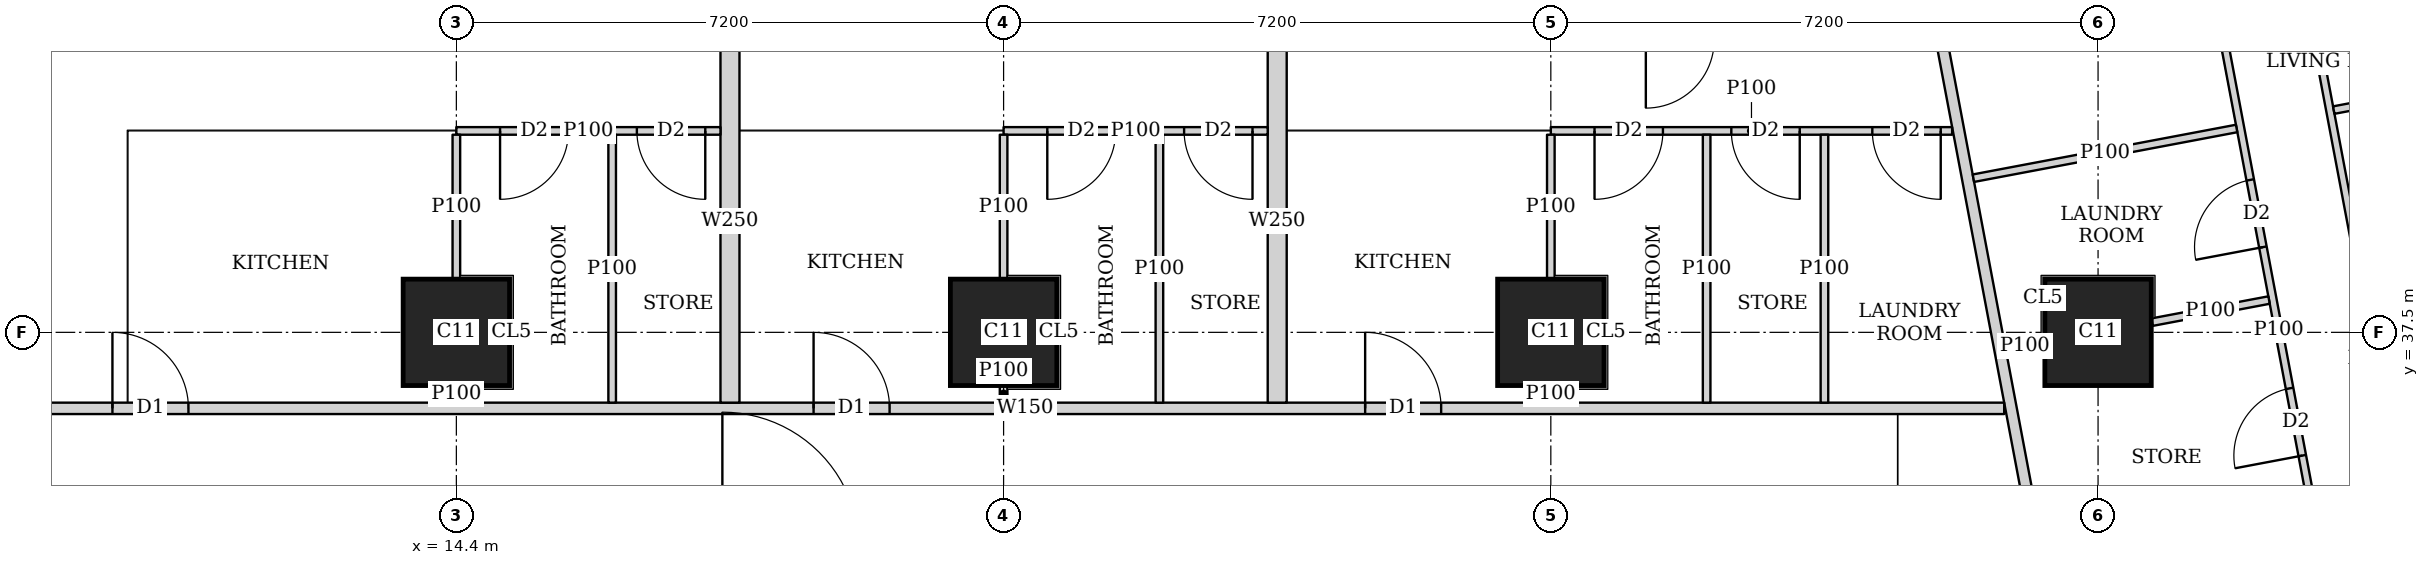
"""IFC4 building model, lengths in metres.
Left out: names, types, materials, properties, quantities, classifications, styles, units other than length and angle.
Written with IfcOpenShell. Run it as: python <this file> out.ifc"""

import sys

from ifc_helpers import new_model, si_unit, direction, frame, frame_2d, origin, origin_2d, place, context, subcontext, project, spatial, rectangle, extrude, element, fill, save


model = new_model("IFC4")
c1 = context("Model", 3, precision=1e-05, world=origin(), true_north=direction((0.0, 1.0)))
c2 = subcontext(c1, "Body", "Model", "MODEL_VIEW")
j1 = project(units=[si_unit("LENGTHUNIT", "METRE"), si_unit("PLANEANGLEUNIT", "RADIAN")], contexts=[c1])
p1 = place(None, origin())
s1 = spatial("IfcSite", under=j1, at=p1, CompositionType="ELEMENT")
p2 = place(p1, origin())
s2 = spatial("IfcBuilding", under=s1, at=p2, CompositionType="ELEMENT")
p3 = place(p2, frame((0.0, 0.0, 212.45)))
s3 = spatial("IfcBuildingStorey", under=s2, at=p3, CompositionType="ELEMENT", Elevation=212.45)
for number, where, z_axis, x_axis in (
    (1, (14.4, 37.5, 0.0), (0.0, 0.0, 1.0), (1.0, 0.0, 0.0)),
    (2, (21.6, 37.5, 0.0), (0.0, 0.0, 1.0), (1.0, 0.0, 0.0)),
    (3, (28.8, 37.5, 0.0), (0.0, 0.0, 1.0), (1.0, 0.0, 0.0)),
    (4, (36.0, 37.5, 0.0), (0.0, 0.0, 1.0), (1.0, 0.0, 0.0)),
):
    element("IfcColumn", number, at=place(p3, frame(where, z_axis=z_axis, x_axis=x_axis)), inside=s3, PredefinedType="COLUMN", context=c2, shape_type="SweptSolid", body=[
        extrude(rectangle(XDim=1.4, YDim=1.4, at=origin_2d()), origin(), (0.0, 0.0, 1.0), 3.75),
    ])
p4 = place(p3, frame((9.001, 36.5, 0.0), z_axis=(0.0, 0.0, 1.0), x_axis=(1.0, 0.0, 0.0)))
e5 = element("IfcWall", 5, at=p4, inside=s3, PredefinedType="SOLIDWALL", context=c2, shape_type="SweptSolid", body=[
    extrude(rectangle(XDim=25.764, YDim=0.15, at=frame_2d((12.882, 0.0))), origin(), (0.0, 0.0, 1.0), 3.5),
])
p5 = place(p4, frame((0.874, 0.0, 0.0)))
e6 = element("IfcOpeningElement", 6, at=p5, cuts=e5, PredefinedType="OPENING", context=c2, shape_type="SweptSolid", body=[
    extrude(rectangle(XDim=1.0, YDim=2.1, at=frame_2d((0.5, 1.05))), frame((0.0, 0.085, 0.0), z_axis=(0.0, -1.0, 0.0), x_axis=(1.0, 0.0, 0.0)), (0.0, 0.0, 1.0), 0.17),
])
p6 = place(p4, frame((10.099, 0.0, 0.0)))
e7 = element("IfcOpeningElement", 7, at=p6, cuts=e5, PredefinedType="OPENING", context=c2, shape_type="SweptSolid", body=[
    extrude(rectangle(XDim=1.0, YDim=2.1, at=frame_2d((0.5, 1.05))), frame((0.0, 0.085, 0.0), z_axis=(0.0, -1.0, 0.0), x_axis=(1.0, 0.0, 0.0)), (0.0, 0.0, 1.0), 0.17),
])
p7 = place(p4, frame((17.356, 0.0, 0.0)))
e8 = element("IfcOpeningElement", 8, at=p7, cuts=e5, PredefinedType="OPENING", context=c2, shape_type="SweptSolid", body=[
    extrude(rectangle(XDim=1.0, YDim=2.1, at=frame_2d((0.5, 1.05))), frame((0.0, 0.085, 0.0), z_axis=(0.0, -1.0, 0.0), x_axis=(1.0, 0.0, 0.0)), (0.0, 0.0, 1.0), 0.17),
])
p8 = place(p3, frame((33.68, 42.723, 0.0), z_axis=(0.0, 0.0, 1.0), x_axis=(0.185601160014, -0.982625162207, 0.0)))
e9 = element("IfcWall", 9, at=p8, inside=s3, PredefinedType="SOLIDWALL", context=c2, shape_type="SweptSolid", body=[
    extrude(rectangle(XDim=41.051, YDim=0.15, at=frame_2d((20.526, 0.0))), origin(), (0.0, 0.0, 1.0), 2.5),
])
p9 = place(p8, frame((12.307, 0.0, 0.0)))
e10 = element("IfcOpeningElement", 10, at=p9, cuts=e9, PredefinedType="OPENING", context=c2, shape_type="SweptSolid", body=[
    extrude(rectangle(XDim=1.0, YDim=2.1, at=frame_2d((0.5, 1.05))), frame((0.0, 0.085, 0.0), z_axis=(0.0, -1.0, 0.0), x_axis=(1.0, 0.0, 0.0)), (0.0, 0.0, 1.0), 0.17),
])
p10 = place(p8, frame((16.123, 0.0, 0.0)))
e11 = element("IfcOpeningElement", 11, at=p10, cuts=e9, PredefinedType="OPENING", context=c2, shape_type="SweptSolid", body=[
    extrude(rectangle(XDim=1.0, YDim=2.1, at=frame_2d((0.5, 1.05))), frame((0.0, 0.085, 0.0), z_axis=(0.0, -1.0, 0.0), x_axis=(1.0, 0.0, 0.0)), (0.0, 0.0, 1.0), 0.17),
])
p11 = place(p8, frame((30.902, 0.0, 0.0)))
e12 = element("IfcOpeningElement", 12, at=p11, cuts=e9, PredefinedType="OPENING", context=c2, shape_type="SweptSolid", body=[
    extrude(rectangle(XDim=1.0, YDim=2.1, at=frame_2d((0.5, 1.05))), frame((0.0, 0.085, 0.0), z_axis=(0.0, -1.0, 0.0), x_axis=(1.0, 0.0, 0.0)), (0.0, 0.0, 1.0), 0.17),
])
p12 = place(p3, frame((38.764, 41.941, 0.0), z_axis=(0.0, 0.0, 1.0), x_axis=(0.185548572312, -0.982635093671, 0.0)))
e13 = element("IfcWall", 13, at=p12, inside=s3, PredefinedType="PARTITIONING", context=c2, shape_type="SweptSolid", body=[
    extrude(rectangle(XDim=9.135, YDim=0.1, at=frame_2d((4.568, 0.0))), origin(), (0.0, 0.0, 1.0), 3.5),
])
p13 = place(p12, frame((8.085, 0.0, 0.0)))
e14 = element("IfcOpeningElement", 14, at=p13, cuts=e13, PredefinedType="OPENING", context=c2, shape_type="SweptSolid", body=[
    extrude(rectangle(XDim=0.9, YDim=2.1, at=frame_2d((0.45, 1.05))), frame((0.0, 0.06, 0.0), z_axis=(0.0, -1.0, 0.0), x_axis=(1.0, 0.0, 0.0)), (0.0, 0.0, 1.0), 0.12),
])
p14 = place(p12, frame((3.7, 0.0, 0.0)))
e15 = element("IfcOpeningElement", 15, at=p14, cuts=e13, PredefinedType="OPENING", context=c2, shape_type="SweptSolid", body=[
    extrude(rectangle(XDim=0.9, YDim=2.1, at=frame_2d((0.45, 1.05))), frame((0.0, 0.06, 0.0), z_axis=(0.0, -1.0, 0.0), x_axis=(1.0, 0.0, 0.0)), (0.0, 0.0, 1.0), 0.12),
])
p15 = place(p3, frame((37.473, 42.309, 0.0), z_axis=(0.0, 0.0, 1.0), x_axis=(0.185491912953, -0.982645790827, 0.0)))
e16 = element("IfcWall", 16, at=p15, inside=s3, PredefinedType="PARTITIONING", context=c2, shape_type="SweptSolid", body=[
    extrude(rectangle(XDim=9.737, YDim=0.1, at=frame_2d((4.869, 0.0))), origin(), (0.0, 0.0, 1.0), 3.5),
])
p16 = place(p15, frame((8.312, 0.0, 0.0)))
e17 = element("IfcOpeningElement", 17, at=p16, cuts=e16, PredefinedType="OPENING", context=c2, shape_type="SweptSolid", body=[
    extrude(rectangle(XDim=0.9, YDim=2.1, at=frame_2d((0.45, 1.05))), frame((0.0, 0.06, 0.0), z_axis=(0.0, -1.0, 0.0), x_axis=(1.0, 0.0, 0.0)), (0.0, 0.0, 1.0), 0.12),
])
p17 = place(p15, frame((2.853, 0.0, 0.0)))
e18 = element("IfcOpeningElement", 18, at=p17, cuts=e16, PredefinedType="OPENING", context=c2, shape_type="SweptSolid", body=[
    extrude(rectangle(XDim=0.9, YDim=2.1, at=frame_2d((0.45, 1.05))), frame((0.0, 0.06, 0.0), z_axis=(0.0, -1.0, 0.0), x_axis=(1.0, 0.0, 0.0)), (0.0, 0.0, 1.0), 0.12),
])
p18 = place(p15, frame((5.644, 0.0, 0.0)))
e19 = element("IfcOpeningElement", 19, at=p18, cuts=e16, PredefinedType="OPENING", context=c2, shape_type="SweptSolid", body=[
    extrude(rectangle(XDim=0.9, YDim=2.1, at=frame_2d((0.45, 1.05))), frame((0.0, 0.06, 0.0), z_axis=(0.0, -1.0, 0.0), x_axis=(1.0, 0.0, 0.0)), (0.0, 0.0, 1.0), 0.12),
])
p19 = place(p3, frame((43.277, 41.212, 0.0), z_axis=(0.0, 0.0, 1.0), x_axis=(-0.982665405803, -0.185387972203, 0.0)))
e20 = element("IfcWall", 20, at=p19, inside=s3, PredefinedType="PARTITIONING", context=c2, shape_type="SweptSolid", body=[
    extrude(rectangle(XDim=4.25, YDim=0.1, at=frame_2d((2.125, 0.0))), origin(), (0.0, 0.0, 1.0), 2.05),
])
p20 = place(p3, frame((37.823, 40.182, 0.0), z_axis=(0.0, 0.0, 1.0), x_axis=(-0.98263926043, -0.185526504472, 0.0)))
e21 = element("IfcWall", 21, at=p20, inside=s3, PredefinedType="PARTITIONING", context=c2, shape_type="SweptSolid", body=[
    extrude(rectangle(XDim=3.524, YDim=0.1, at=frame_2d((1.762, 0.0))), origin(), (0.0, 0.0, 1.0), 3.5),
])
p21 = place(p3, frame((38.25, 37.925, 0.0), z_axis=(0.0, 0.0, 1.0), x_axis=(-0.982610209589, -0.185680305934, 0.0)))
e22 = element("IfcWall", 22, at=p21, inside=s3, PredefinedType="PARTITIONING", context=c2, shape_type="SweptSolid", body=[
    extrude(rectangle(XDim=1.567, YDim=0.1, at=frame_2d((0.784, 0.0))), origin(), (0.0, 0.0, 1.0), 3.5),
])
p22 = place(p3, frame((35.29, 37.366, 0.0), z_axis=(0.0, 0.0, 1.0), x_axis=(-0.982715597703, -0.185121727606, 0.0)))
e23 = element("IfcWall", 23, at=p22, inside=s3, PredefinedType="PARTITIONING", context=c2, shape_type="SweptSolid", body=[
    extrude(rectangle(XDim=0.513, YDim=0.1, at=frame_2d((0.256, 0.0))), origin(), (0.0, 0.0, 1.0), 3.5),
])
p23 = place(p3, frame((14.4, 40.15, 0.0), z_axis=(0.0, 0.0, 1.0), x_axis=(1.0, 0.0, 0.0)))
e24 = element("IfcWall", 24, at=p23, inside=s3, PredefinedType="PARTITIONING", context=c2, shape_type="SweptSolid", body=[
    extrude(rectangle(XDim=3.475, YDim=0.1, at=frame_2d((1.738, 0.0))), origin(), (0.0, 0.0, 1.0), 3.5),
])
p24 = place(p23, frame((0.575, 0.0, 0.0)))
e25 = element("IfcOpeningElement", 25, at=p24, cuts=e24, PredefinedType="OPENING", context=c2, shape_type="SweptSolid", body=[
    extrude(rectangle(XDim=0.9, YDim=2.1, at=frame_2d((0.45, 1.05))), frame((0.0, 0.06, 0.0), z_axis=(0.0, -1.0, 0.0), x_axis=(1.0, 0.0, 0.0)), (0.0, 0.0, 1.0), 0.12),
])
p25 = place(p23, frame((2.375, 0.0, 0.0)))
e26 = element("IfcOpeningElement", 26, at=p25, cuts=e24, PredefinedType="OPENING", context=c2, shape_type="SweptSolid", body=[
    extrude(rectangle(XDim=0.9, YDim=2.1, at=frame_2d((0.45, 1.05))), frame((0.0, 0.06, 0.0), z_axis=(0.0, -1.0, 0.0), x_axis=(1.0, 0.0, 0.0)), (0.0, 0.0, 1.0), 0.12),
])
p26 = place(p3, frame((14.4, 36.575, 0.0), z_axis=(0.0, 0.0, 1.0), x_axis=(0.0, 1.0, 0.0)))
e27 = element("IfcWall", 27, at=p26, inside=s3, PredefinedType="PARTITIONING", context=c2, shape_type="SweptSolid", body=[
    extrude(rectangle(XDim=0.224, YDim=0.1, at=frame_2d((0.112, 0.0))), origin(), (0.0, 0.0, 1.0), 3.5),
])
p27 = place(p3, frame((14.4, 38.201, 0.0), z_axis=(0.0, 0.0, 1.0), x_axis=(0.0, 1.0, 0.0)))
e28 = element("IfcWall", 28, at=p27, inside=s3, PredefinedType="PARTITIONING", context=c2, shape_type="SweptSolid", body=[
    extrude(rectangle(XDim=1.899, YDim=0.1, at=frame_2d((0.95, 0.0))), origin(), (0.0, 0.0, 1.0), 3.5),
])
p28 = place(p3, frame((16.45, 36.575, 0.0), z_axis=(0.0, 0.0, 1.0), x_axis=(0.0, 1.0, 0.0)))
e29 = element("IfcWall", 29, at=p28, inside=s3, PredefinedType="PARTITIONING", context=c2, shape_type="SweptSolid", body=[
    extrude(rectangle(XDim=3.525, YDim=0.1, at=frame_2d((1.763, 0.0))), origin(), (0.0, 0.0, 1.0), 3.5),
])
p29 = place(p3, frame((21.6, 40.15, 0.0), z_axis=(0.0, 0.0, 1.0), x_axis=(1.0, 0.0, 0.0)))
e30 = element("IfcWall", 30, at=p29, inside=s3, PredefinedType="PARTITIONING", context=c2, shape_type="SweptSolid", body=[
    extrude(rectangle(XDim=3.475, YDim=0.1, at=frame_2d((1.737, 0.0))), origin(), (0.0, 0.0, 1.0), 3.5),
])
p30 = place(p29, frame((0.575, 0.0, 0.0)))
e31 = element("IfcOpeningElement", 31, at=p30, cuts=e30, PredefinedType="OPENING", context=c2, shape_type="SweptSolid", body=[
    extrude(rectangle(XDim=0.9, YDim=2.1, at=frame_2d((0.45, 1.05))), frame((0.0, 0.06, 0.0), z_axis=(0.0, -1.0, 0.0), x_axis=(1.0, 0.0, 0.0)), (0.0, 0.0, 1.0), 0.12),
])
p31 = place(p29, frame((2.375, 0.0, 0.0)))
e32 = element("IfcOpeningElement", 32, at=p31, cuts=e30, PredefinedType="OPENING", context=c2, shape_type="SweptSolid", body=[
    extrude(rectangle(XDim=0.9, YDim=2.1, at=frame_2d((0.45, 1.05))), frame((0.0, 0.06, 0.0), z_axis=(0.0, -1.0, 0.0), x_axis=(1.0, 0.0, 0.0)), (0.0, 0.0, 1.0), 0.12),
])
p32 = place(p3, frame((21.6, 36.575, 0.0), z_axis=(0.0, 0.0, 1.0), x_axis=(0.0, 1.0, 0.0)))
e33 = element("IfcWall", 33, at=p32, inside=s3, PredefinedType="PARTITIONING", context=c2, shape_type="SweptSolid", body=[
    extrude(rectangle(XDim=0.224, YDim=0.1, at=frame_2d((0.112, 0.0))), origin(), (0.0, 0.0, 1.0), 3.5),
])
p33 = place(p3, frame((21.6, 38.201, 0.0), z_axis=(0.0, 0.0, 1.0), x_axis=(0.0, 1.0, 0.0)))
e34 = element("IfcWall", 34, at=p33, inside=s3, PredefinedType="PARTITIONING", context=c2, shape_type="SweptSolid", body=[
    extrude(rectangle(XDim=1.899, YDim=0.1, at=frame_2d((0.95, 0.0))), origin(), (0.0, 0.0, 1.0), 3.5),
])
p34 = place(p3, frame((23.65, 36.575, 0.0), z_axis=(0.0, 0.0, 1.0), x_axis=(0.0, 1.0, 0.0)))
e35 = element("IfcWall", 35, at=p34, inside=s3, PredefinedType="PARTITIONING", context=c2, shape_type="SweptSolid", body=[
    extrude(rectangle(XDim=3.525, YDim=0.1, at=frame_2d((1.763, 0.0))), origin(), (0.0, 0.0, 1.0), 3.5),
])
p35 = place(p3, frame((18.0, 36.575, 0.0), z_axis=(0.0, 0.0, 1.0), x_axis=(0.0, 1.0, 0.0)))
e36 = element("IfcWall", 36, at=p35, inside=s3, PredefinedType="SOLIDWALL", context=c2, shape_type="SweptSolid", body=[
    extrude(rectangle(XDim=4.775, YDim=0.25, at=frame_2d((2.388, 0.0))), origin(), (0.0, 0.0, 1.0), 3.5),
])
p36 = place(p3, frame((28.8, 40.15, 0.0), z_axis=(0.0, 0.0, 1.0), x_axis=(1.0, 0.0, 0.0)))
e37 = element("IfcWall", 37, at=p36, inside=s3, PredefinedType="PARTITIONING", context=c2, shape_type="SweptSolid", body=[
    extrude(rectangle(XDim=5.28, YDim=0.1, at=frame_2d((2.64, 0.0))), origin(), (0.0, 0.0, 1.0), 3.5),
])
p37 = place(p36, frame((0.575, 0.0, 0.0)))
e38 = element("IfcOpeningElement", 38, at=p37, cuts=e37, PredefinedType="OPENING", context=c2, shape_type="SweptSolid", body=[
    extrude(rectangle(XDim=0.9, YDim=2.1, at=frame_2d((0.45, 1.05))), frame((0.0, 0.06, 0.0), z_axis=(0.0, -1.0, 0.0), x_axis=(1.0, 0.0, 0.0)), (0.0, 0.0, 1.0), 0.12),
])
p38 = place(p36, frame((4.23, 0.0, 0.0)))
e39 = element("IfcOpeningElement", 39, at=p38, cuts=e37, PredefinedType="OPENING", context=c2, shape_type="SweptSolid", body=[
    extrude(rectangle(XDim=0.9, YDim=2.1, at=frame_2d((0.45, 1.05))), frame((0.0, 0.06, 0.0), z_axis=(0.0, -1.0, 0.0), x_axis=(1.0, 0.0, 0.0)), (0.0, 0.0, 1.0), 0.12),
])
p39 = place(p36, frame((2.375, 0.0, 0.0)))
e40 = element("IfcOpeningElement", 40, at=p39, cuts=e37, PredefinedType="OPENING", context=c2, shape_type="SweptSolid", body=[
    extrude(rectangle(XDim=0.9, YDim=2.1, at=frame_2d((0.45, 1.05))), frame((0.0, 0.06, 0.0), z_axis=(0.0, -1.0, 0.0), x_axis=(1.0, 0.0, 0.0)), (0.0, 0.0, 1.0), 0.12),
])
p40 = place(p3, frame((28.8, 36.575, 0.0), z_axis=(0.0, 0.0, 1.0), x_axis=(0.0, 1.0, 0.0)))
e41 = element("IfcWall", 41, at=p40, inside=s3, PredefinedType="PARTITIONING", context=c2, shape_type="SweptSolid", body=[
    extrude(rectangle(XDim=0.224, YDim=0.1, at=frame_2d((0.112, 0.0))), origin(), (0.0, 0.0, 1.0), 3.5),
])
p41 = place(p3, frame((28.8, 38.201, 0.0), z_axis=(0.0, 0.0, 1.0), x_axis=(0.0, 1.0, 0.0)))
e42 = element("IfcWall", 42, at=p41, inside=s3, PredefinedType="PARTITIONING", context=c2, shape_type="SweptSolid", body=[
    extrude(rectangle(XDim=1.899, YDim=0.1, at=frame_2d((0.95, 0.0))), origin(), (0.0, 0.0, 1.0), 3.5),
])
for number, where, z_axis, x_axis in (
    (43, (32.4, 36.575, 0.0), (0.0, 0.0, 1.0), (0.0, 1.0, 0.0)),
    (44, (30.85, 36.575, 0.0), (0.0, 0.0, 1.0), (0.0, 1.0, 0.0)),
):
    element("IfcWall", number, at=place(p3, frame(where, z_axis=z_axis, x_axis=x_axis)), inside=s3, PredefinedType="PARTITIONING", context=c2, shape_type="SweptSolid", body=[
        extrude(rectangle(XDim=3.525, YDim=0.1, at=frame_2d((1.763, 0.0))), origin(), (0.0, 0.0, 1.0), 3.5),
    ])
p42 = place(p3, frame((25.2, 36.575, 0.0), z_axis=(0.0, 0.0, 1.0), x_axis=(0.0, 1.0, 0.0)))
e45 = element("IfcWall", 45, at=p42, inside=s3, PredefinedType="SOLIDWALL", context=c2, shape_type="SweptSolid", body=[
    extrude(rectangle(XDim=4.775, YDim=0.25, at=frame_2d((2.388, 0.0))), origin(), (0.0, 0.0, 1.0), 3.5),
])
p43 = place(p17, origin())
e46 = element("IfcDoor", 46, at=p43, inside=s3, OperationType="SINGLE_SWING_LEFT", PredefinedType="DOOR", context=c2, shape_type="SweptSolid", body=[
    extrude(rectangle(XDim=0.9, YDim=2.1, at=frame_2d((0.45, 1.05))), frame((0.0, 0.025, 0.0), z_axis=(0.0, -1.0, 0.0), x_axis=(1.0, 0.0, 0.0)), (0.0, 0.0, 1.0), 0.05),
])
fill(e18, e46)
p44 = place(p18, origin())
e47 = element("IfcDoor", 47, at=p44, inside=s3, OperationType="SINGLE_SWING_LEFT", PredefinedType="DOOR", context=c2, shape_type="SweptSolid", body=[
    extrude(rectangle(XDim=0.9, YDim=2.1, at=frame_2d((0.45, 1.05))), frame((0.0, 0.025, 0.0), z_axis=(0.0, -1.0, 0.0), x_axis=(1.0, 0.0, 0.0)), (0.0, 0.0, 1.0), 0.05),
])
fill(e19, e47)
p45 = place(p24, origin())
e48 = element("IfcDoor", 48, at=p45, inside=s3, OperationType="SINGLE_SWING_RIGHT", PredefinedType="DOOR", context=c2, shape_type="SweptSolid", body=[
    extrude(rectangle(XDim=0.9, YDim=2.1, at=frame_2d((0.45, 1.05))), frame((0.0, 0.025, 0.0), z_axis=(0.0, -1.0, 0.0), x_axis=(1.0, 0.0, 0.0)), (0.0, 0.0, 1.0), 0.05),
])
fill(e25, e48)
p46 = place(p25, origin())
e49 = element("IfcDoor", 49, at=p46, inside=s3, OperationType="SINGLE_SWING_LEFT", PredefinedType="DOOR", context=c2, shape_type="SweptSolid", body=[
    extrude(rectangle(XDim=0.9, YDim=2.1, at=frame_2d((0.45, 1.05))), frame((0.0, 0.025, 0.0), z_axis=(0.0, -1.0, 0.0), x_axis=(1.0, 0.0, 0.0)), (0.0, 0.0, 1.0), 0.05),
])
fill(e26, e49)
p47 = place(p5, origin())
e50 = element("IfcDoor", 50, at=p47, inside=s3, OperationType="SINGLE_SWING_LEFT", PredefinedType="DOOR", context=c2, shape_type="SweptSolid", body=[
    extrude(rectangle(XDim=1.0, YDim=2.1, at=frame_2d((0.5, 1.05))), frame((0.0, 0.025, 0.0), z_axis=(0.0, -1.0, 0.0), x_axis=(1.0, 0.0, 0.0)), (0.0, 0.0, 1.0), 0.05),
])
fill(e6, e50)
p48 = place(p30, origin())
e51 = element("IfcDoor", 51, at=p48, inside=s3, OperationType="SINGLE_SWING_RIGHT", PredefinedType="DOOR", context=c2, shape_type="SweptSolid", body=[
    extrude(rectangle(XDim=0.9, YDim=2.1, at=frame_2d((0.45, 1.05))), frame((0.0, 0.025, 0.0), z_axis=(0.0, -1.0, 0.0), x_axis=(1.0, 0.0, 0.0)), (0.0, 0.0, 1.0), 0.05),
])
fill(e31, e51)
p49 = place(p31, origin())
e52 = element("IfcDoor", 52, at=p49, inside=s3, OperationType="SINGLE_SWING_LEFT", PredefinedType="DOOR", context=c2, shape_type="SweptSolid", body=[
    extrude(rectangle(XDim=0.9, YDim=2.1, at=frame_2d((0.45, 1.05))), frame((0.0, 0.025, 0.0), z_axis=(0.0, -1.0, 0.0), x_axis=(1.0, 0.0, 0.0)), (0.0, 0.0, 1.0), 0.05),
])
fill(e32, e52)
p50 = place(p6, origin())
e53 = element("IfcDoor", 53, at=p50, inside=s3, OperationType="SINGLE_SWING_LEFT", PredefinedType="DOOR", context=c2, shape_type="SweptSolid", body=[
    extrude(rectangle(XDim=1.0, YDim=2.1, at=frame_2d((0.5, 1.05))), frame((0.0, 0.025, 0.0), z_axis=(0.0, -1.0, 0.0), x_axis=(1.0, 0.0, 0.0)), (0.0, 0.0, 1.0), 0.05),
])
fill(e7, e53)
p51 = place(p37, origin())
e54 = element("IfcDoor", 54, at=p51, inside=s3, OperationType="SINGLE_SWING_RIGHT", PredefinedType="DOOR", context=c2, shape_type="SweptSolid", body=[
    extrude(rectangle(XDim=0.9, YDim=2.1, at=frame_2d((0.45, 1.05))), frame((0.0, 0.025, 0.0), z_axis=(0.0, -1.0, 0.0), x_axis=(1.0, 0.0, 0.0)), (0.0, 0.0, 1.0), 0.05),
])
fill(e38, e54)
p52 = place(p38, origin())
e55 = element("IfcDoor", 55, at=p52, inside=s3, OperationType="SINGLE_SWING_LEFT", PredefinedType="DOOR", context=c2, shape_type="SweptSolid", body=[
    extrude(rectangle(XDim=0.9, YDim=2.1, at=frame_2d((0.45, 1.05))), frame((0.0, 0.025, 0.0), z_axis=(0.0, -1.0, 0.0), x_axis=(1.0, 0.0, 0.0)), (0.0, 0.0, 1.0), 0.05),
])
fill(e39, e55)
p53 = place(p39, origin())
e56 = element("IfcDoor", 56, at=p53, inside=s3, OperationType="SINGLE_SWING_LEFT", PredefinedType="DOOR", context=c2, shape_type="SweptSolid", body=[
    extrude(rectangle(XDim=0.9, YDim=2.1, at=frame_2d((0.45, 1.05))), frame((0.0, 0.025, 0.0), z_axis=(0.0, -1.0, 0.0), x_axis=(1.0, 0.0, 0.0)), (0.0, 0.0, 1.0), 0.05),
])
fill(e40, e56)
p54 = place(p7, origin())
e57 = element("IfcDoor", 57, at=p54, inside=s3, OperationType="SINGLE_SWING_LEFT", PredefinedType="DOOR", context=c2, shape_type="SweptSolid", body=[
    extrude(rectangle(XDim=1.0, YDim=2.1, at=frame_2d((0.5, 1.05))), frame((0.0, 0.025, 0.0), z_axis=(0.0, -1.0, 0.0), x_axis=(1.0, 0.0, 0.0)), (0.0, 0.0, 1.0), 0.05),
])
fill(e8, e57)
save(model, sys.argv[1])
